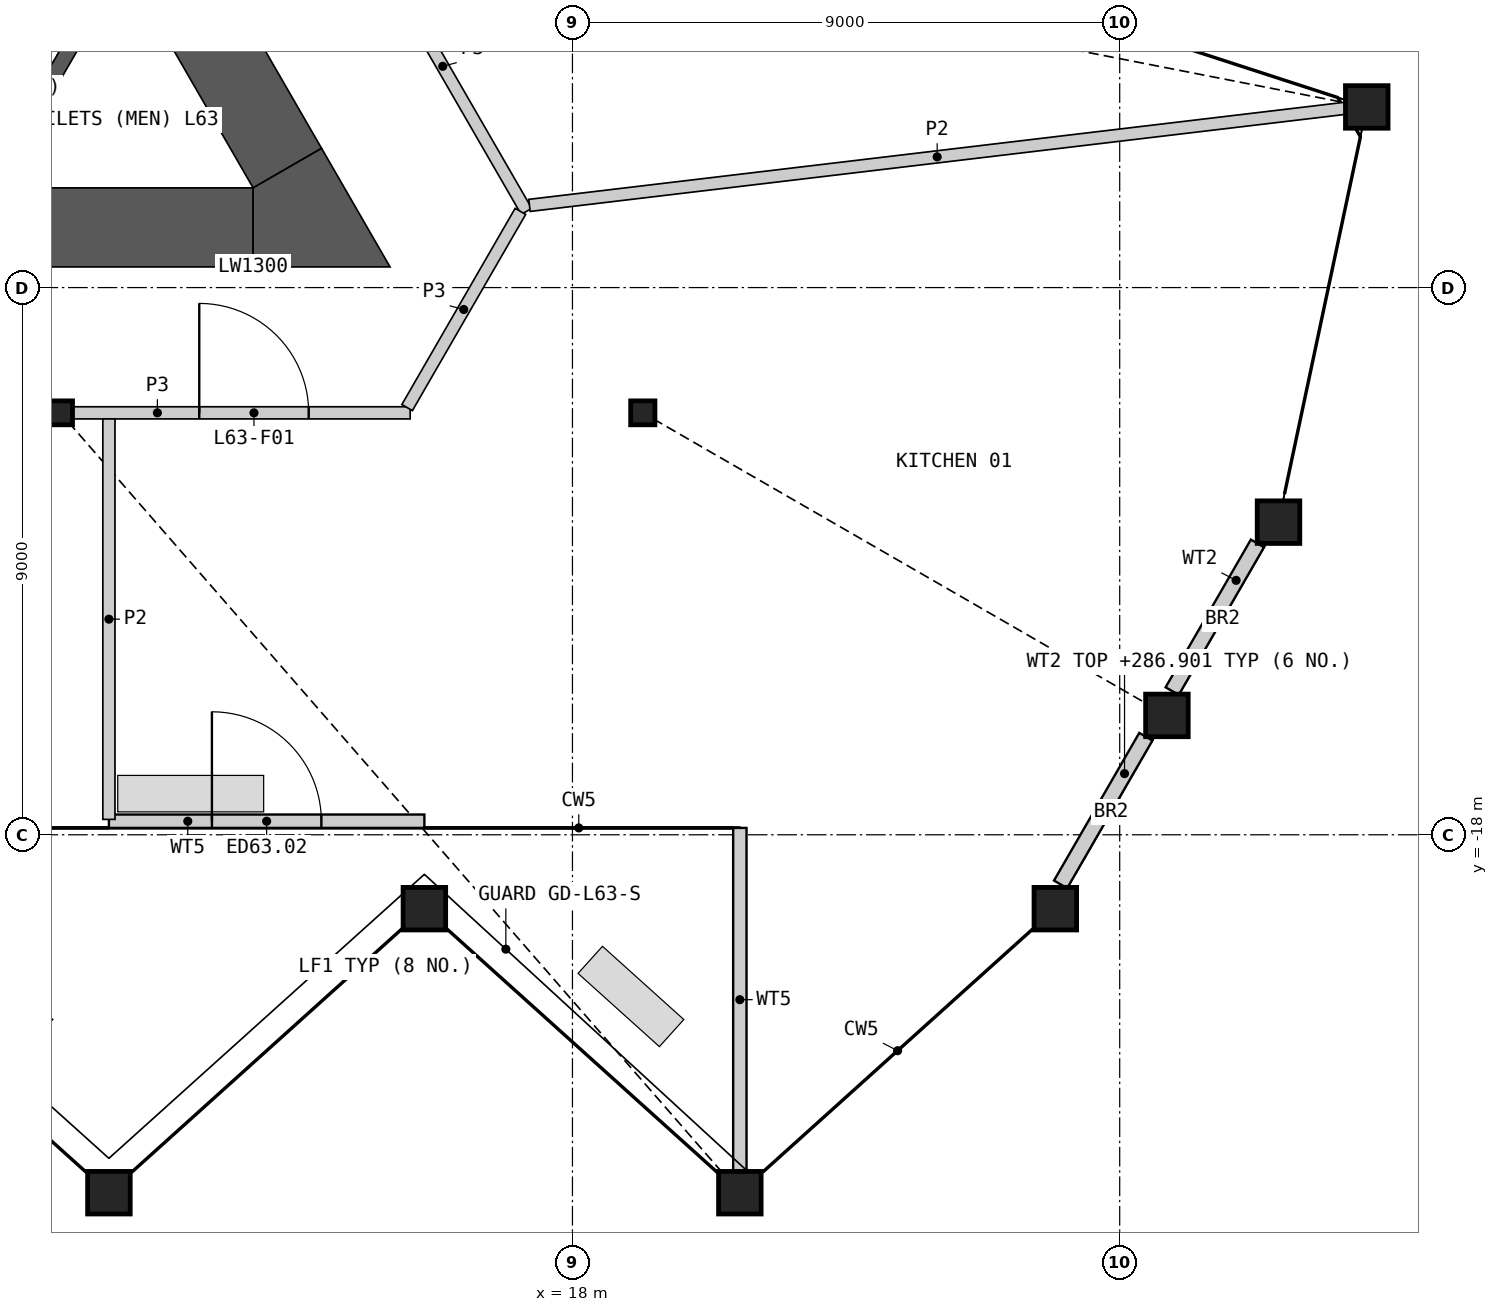
"""IFC4 building model, lengths in metres.
Left out: names, types, materials, properties, quantities, classifications, styles, units other than length and angle.
Written with IfcOpenShell. Run it as: python <this file> out.ifc"""

import sys

from ifc_helpers import new_model, si_unit, direction, frame, frame_2d, origin, origin_2d, place, context, subcontext, project, spatial, polyline, rectangle, hollow_rectangle, i_section, outline, extrude, element, fill, save


model = new_model("IFC4")
c1 = context("Model", 3, precision=1e-05, world=origin(), true_north=direction((0.0, 1.0)))
c2 = subcontext(c1, "Body", "Model", "MODEL_VIEW")
j1 = project(units=[si_unit("LENGTHUNIT", "METRE"), si_unit("PLANEANGLEUNIT", "RADIAN")], contexts=[c1])
p1 = place(None, origin())
s1 = spatial("IfcSite", under=j1, at=p1, CompositionType="ELEMENT")
p2 = place(p1, origin())
s2 = spatial("IfcBuilding", under=s1, at=p2, CompositionType="ELEMENT")
p3 = place(p2, frame((0.0, 0.0, 277.8)))
s3 = spatial("IfcBuildingStorey", under=s2, at=p3, CompositionType="ELEMENT", Elevation=277.8)
for number, where, z_axis, x_axis in (
    (1, (10.376, -23.887, 0.0), (0.0, 0.0, 1.0), (1.0, 0.0, 0.0)),
    (2, (15.565, -19.215, 0.0), (0.0, 0.0, 1.0), (1.0, 0.0, 0.0)),
    (3, (20.753, -23.887, 0.0), (0.0, 0.0, 1.0), (1.0, 0.0, 0.0)),
    (4, (25.941, -19.215, 0.0), (0.0, 0.0, 1.0), (1.0, 0.0, 0.0)),
    (5, (27.776, -16.037, 0.0), (0.0, 0.0, 1.0), (1.0, 0.0, 0.0)),
    (6, (29.612, -12.858, 0.0), (0.0, 0.0, 1.0), (1.0, 0.0, 0.0)),
    (7, (31.063, -6.029, 0.0), (0.0, 0.0, 1.0), (1.0, 0.0, 0.0)),
):
    element("IfcColumn", number, at=place(p3, frame(where, z_axis=z_axis, x_axis=x_axis)), inside=s3, PredefinedType="COLUMN", context=c2, shape_type="SweptSolid", body=[
        extrude(hollow_rectangle(XDim=0.7, YDim=0.7, WallThickness=0.045, at=origin_2d()), origin(), (0.0, 0.0, 1.0), 10.0),
    ])
for number, where, z_axis, x_axis in (
    (8, (9.578, -11.06, 0.0), (0.0, 0.0, 1.0), (1.0, 0.0, 0.0)),
    (9, (19.157, -11.06, 0.0), (0.0, 0.0, 1.0), (1.0, 0.0, 0.0)),
):
    element("IfcColumn", number, at=place(p3, frame(where, z_axis=z_axis, x_axis=x_axis)), inside=s3, PredefinedType="COLUMN", context=c2, shape_type="SweptSolid", body=[
        extrude(i_section(OverallWidth=0.399, OverallDepth=0.393, WebThickness=0.023, FlangeThickness=0.037, at=origin_2d()), origin(), (0.0, 0.0, 1.0), 10.0),
    ])
for number, where, z_axis, x_axis in (
    (10, (26.028, -18.815, 0.0), (0.0, 0.0, 1.0), (0.5, 0.866, 0.0)),
    (11, (27.863, -15.637, 0.0), (0.0, 0.0, 1.0), (0.5, 0.866, 0.0)),
):
    element("IfcWall", number, at=place(p3, frame(where, z_axis=z_axis, x_axis=x_axis)), inside=s3, PredefinedType="SOLIDWALL", context=c2, shape_type="SweptSolid", body=[
        extrude(rectangle(XDim=2.804, YDim=0.25, at=frame_2d((1.402, 0.0))), origin(), (0.0, 0.0, 1.0), 9.101),
    ])
p4 = place(p3, frame((10.376, -17.777, 0.0), z_axis=(0.0, 0.0, 1.0), x_axis=(1.0, 0.0, 0.0)))
e12 = element("IfcWall", 12, at=p4, inside=s3, PredefinedType="SOLIDWALL", context=c2, shape_type="SweptSolid", body=[
    extrude(rectangle(XDim=5.188, YDim=0.22, at=frame_2d((2.594, 0.0))), origin(), (0.0, 0.0, 1.0), 9.101),
])
p5 = place(p4, frame((1.694, 0.0, 0.0)))
e13 = element("IfcOpeningElement", 13, at=p5, cuts=e12, PredefinedType="OPENING", context=c2, shape_type="SweptSolid", body=[
    extrude(rectangle(XDim=1.8, YDim=2.4, at=frame_2d((0.9, 1.2))), frame((0.0, 0.12, 0.0), z_axis=(0.0, -1.0, 0.0), x_axis=(1.0, 0.0, 0.0)), (0.0, 0.0, 1.0), 0.24),
])
p6 = place(p3, frame((20.753, -23.537, 0.0), z_axis=(0.0, 0.0, 1.0), x_axis=(0.0, 1.0, 0.0)))
e14 = element("IfcWall", 14, at=p6, inside=s3, PredefinedType="SOLIDWALL", context=c2, shape_type="SweptSolid", body=[
    extrude(rectangle(XDim=5.65, YDim=0.22, at=frame_2d((2.825, 0.0))), origin(), (0.0, 0.0, 1.0), 9.101),
])
p7 = place(p3, origin())
e15 = element("IfcWall", 15, at=p7, inside=s3, PredefinedType="SHEAR", context=c2, shape_type="SweptSolid", body=[
    extrude(outline(polyline([(8.83, -6.881), (10.374, -4.206), (10.032, -4.298), (8.738, -6.539), (8.83, -6.881)])), origin(), (0.0, 0.0, 1.0), 9.65),
])
p8 = place(p3, frame((-12.748, -8.01, 0.0), z_axis=(0.0, 0.0, 1.0), x_axis=(1.0, 0.0, 0.0)))
e16 = element("IfcWall", 16, at=p8, inside=s3, PredefinedType="SHEAR", context=c2, shape_type="SweptSolid", body=[
    extrude(rectangle(XDim=25.497, YDim=1.3, at=frame_2d((12.748, 0.0))), origin(), (0.0, 0.0, 1.0), 9.65),
])
p9 = place(p3, frame((13.311, -7.035, 0.0), z_axis=(0.0, 0.0, 1.0), x_axis=(-0.500003555838, 0.866023350811, 0.0)))
e17 = element("IfcWall", 17, at=p9, inside=s3, PredefinedType="SHEAR", context=c2, shape_type="SweptSolid", body=[
    extrude(rectangle(XDim=4.26, YDim=1.3, at=frame_2d((2.13, 0.0))), origin(), (0.0, 0.0, 1.0), 9.65),
])
p10 = place(p3, origin())
e18 = element("IfcWall", 18, at=p10, inside=s3, PredefinedType="SHEAR", context=c2, shape_type="SweptSolid", body=[
    extrude(outline(polyline([(12.748, -8.66), (12.748, -7.36), (13.874, -6.71), (15.0, -8.66), (12.748, -8.66)])), origin(), (0.0, 0.0, 1.0), 9.65),
])
p11 = place(p3, frame((9.788, -11.06, 0.0), z_axis=(0.0, 0.0, 1.0), x_axis=(1.0, 0.0, 0.0)))
e19 = element("IfcWall", 19, at=p11, inside=s3, PredefinedType="PARTITIONING", context=c2, shape_type="SweptSolid", body=[
    extrude(rectangle(XDim=5.543, YDim=0.2, at=frame_2d((2.771, 0.0))), origin(), (0.0, 0.0, 1.0), 9.65),
])
p12 = place(p11, frame((2.074, 0.0, 0.0)))
e20 = element("IfcOpeningElement", 20, at=p12, cuts=e19, PredefinedType="OPENING", context=c2, shape_type="SweptSolid", body=[
    extrude(rectangle(XDim=1.8, YDim=2.1, at=frame_2d((0.9, 1.05))), frame((0.0, 0.11, 0.0), z_axis=(0.0, -1.0, 0.0), x_axis=(1.0, 0.0, 0.0)), (0.0, 0.0, 1.0), 0.22),
])
p13 = place(p3, frame((14.489, -2.975, 0.0), z_axis=(0.0, 0.0, 1.0), x_axis=(0.500017753321, -0.866015153657, 0.0)))
e21 = element("IfcWall", 21, at=p13, inside=s3, PredefinedType="PARTITIONING", context=c2, shape_type="SweptSolid", body=[
    extrude(rectangle(XDim=5.51, YDim=0.2, at=frame_2d((2.755, 0.0))), origin(), (0.0, 0.0, 1.0), 9.65),
])
p14 = place(p3, frame((15.281, -10.974, 0.0), z_axis=(0.0, 0.0, 1.0), x_axis=(0.499958791762, 0.866049194065, 0.0)))
e22 = element("IfcWall", 22, at=p14, inside=s3, PredefinedType="PARTITIONING", context=c2, shape_type="SweptSolid", body=[
    extrude(rectangle(XDim=3.726, YDim=0.2, at=frame_2d((1.863, 0.0))), origin(), (0.0, 0.0, 1.0), 9.65),
])
p15 = place(p3, frame((17.293, -7.648, 0.0), z_axis=(0.0, 0.0, 1.0), x_axis=(0.992988122615, 0.118214163049, 0.0)))
e23 = element("IfcWall", 23, at=p15, inside=s3, PredefinedType="PARTITIONING", context=c2, shape_type="SweptSolid", body=[
    extrude(rectangle(XDim=13.505, YDim=0.2, at=frame_2d((6.752, 0.0))), origin(), (0.0, 0.0, 1.0), 8.804),
])
p16 = place(p3, frame((10.376, -17.747, 0.0), z_axis=(0.0, 0.0, 1.0), x_axis=(0.0, 1.0, 0.0)))
e24 = element("IfcWall", 24, at=p16, inside=s3, PredefinedType="PARTITIONING", context=c2, shape_type="SweptSolid", body=[
    extrude(rectangle(XDim=6.586, YDim=0.2, at=frame_2d((3.293, 0.0))), origin(), (0.0, 0.0, 1.0), 8.804),
])
p17 = place(p5, origin())
e25 = element("IfcDoor", 25, at=p17, inside=s3, OperationType="DOUBLE_DOOR_SINGLE_SWING", PredefinedType="DOOR", context=c2, shape_type="SweptSolid", body=[
    extrude(rectangle(XDim=1.8, YDim=2.4, at=frame_2d((0.9, 1.2))), frame((0.0, 0.025, 0.0), z_axis=(0.0, -1.0, 0.0), x_axis=(1.0, 0.0, 0.0)), (0.0, 0.0, 1.0), 0.05),
])
fill(e13, e25)
p18 = place(p12, origin())
e26 = element("IfcDoor", 26, at=p18, inside=s3, OperationType="DOUBLE_DOOR_SINGLE_SWING", PredefinedType="DOOR", context=c2, shape_type="SweptSolid", body=[
    extrude(rectangle(XDim=1.8, YDim=2.1, at=frame_2d((0.9, 1.05))), frame((0.0, 0.025, 0.0), z_axis=(0.0, -1.0, 0.0), x_axis=(1.0, 0.0, 0.0)), (0.0, 0.0, 1.0), 0.05),
])
fill(e20, e26)
save(model, sys.argv[1])
